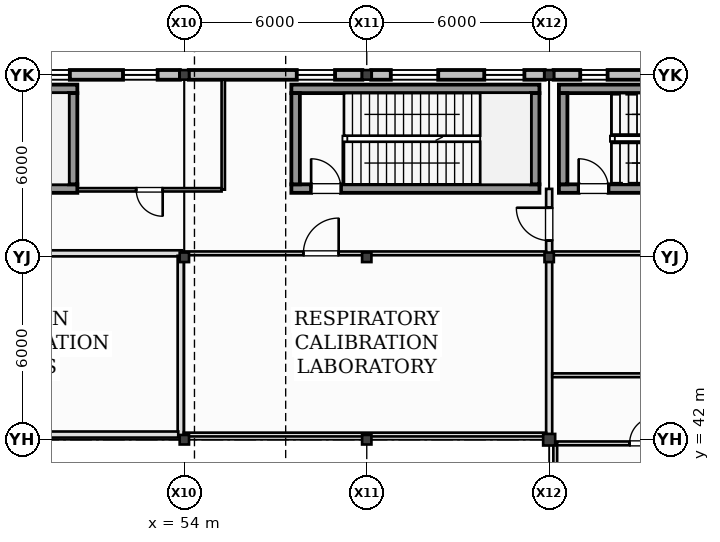
"""IFC4 building model, lengths in metres.
Left out: names, types, materials, properties, quantities, classifications, styles, units other than length and angle.
Written with IfcOpenShell. Run it as: python <this file> out.ifc"""

import sys

from ifc_helpers import new_model, si_unit, direction, frame, frame_2d, origin, origin_2d, place, context, subcontext, project, spatial, rectangle, i_section, extrude, element, fill, save


model = new_model("IFC4")
c1 = context("Model", 3, precision=1e-05, world=origin(), true_north=direction((0.0, 1.0)))
c2 = subcontext(c1, "Body", "Model", "MODEL_VIEW")
j1 = project(units=[si_unit("LENGTHUNIT", "METRE"), si_unit("PLANEANGLEUNIT", "RADIAN")], contexts=[c1])
p1 = place(None, origin())
s1 = spatial("IfcSite", under=j1, at=p1, CompositionType="ELEMENT")
p2 = place(p1, origin())
s2 = spatial("IfcBuilding", under=s1, at=p2, CompositionType="ELEMENT")
p3 = place(p2, frame((0.0, 0.0, 6.0)))
s3 = spatial("IfcBuildingStorey", under=s2, at=p3, CompositionType="ELEMENT", Elevation=6.0)
for number, where, z_axis, x_axis in (
    (1, (54.0, 42.0, 0.0), (0.0, 0.0, 1.0), (1.0, 0.0, 0.0)),
    (2, (54.0, 48.0, 0.0), (0.0, 0.0, 1.0), (1.0, 0.0, 0.0)),
    (3, (54.0, 54.0, 0.0), (0.0, 0.0, 1.0), (1.0, 0.0, 0.0)),
    (4, (60.0, 42.0, 0.0), (0.0, 0.0, 1.0), (1.0, 0.0, 0.0)),
    (5, (60.0, 48.0, 0.0), (0.0, 0.0, 1.0), (1.0, 0.0, 0.0)),
    (6, (60.0, 54.0, 0.0), (0.0, 0.0, 1.0), (1.0, 0.0, 0.0)),
):
    element("IfcColumn", number, at=place(p3, frame(where, z_axis=z_axis, x_axis=x_axis)), inside=s3, PredefinedType="COLUMN", context=c2, shape_type="SweptSolid", body=[
        extrude(i_section(OverallWidth=0.307, OverallDepth=0.314, WebThickness=0.011, FlangeThickness=0.019, at=origin_2d()), origin(), (0.0, 0.0, 1.0), 4.0),
    ])
p4 = place(p3, frame((66.0, 42.0, 0.0), z_axis=(0.0, 0.0, 1.0), x_axis=(1.0, 0.0, 0.0)))
e7 = element("IfcColumn", 7, at=p4, inside=s3, PredefinedType="COLUMN", context=c2, shape_type="SweptSolid", body=[
    extrude(i_section(OverallWidth=0.395, OverallDepth=0.38, WebThickness=0.019, FlangeThickness=0.03, at=origin_2d()), origin(), (0.0, 0.0, 1.0), 4.0),
])
for number, where, z_axis, x_axis in (
    (8, (66.0, 48.0, 0.0), (0.0, 0.0, 1.0), (1.0, 0.0, 0.0)),
    (9, (66.0, 54.0, 0.0), (0.0, 0.0, 1.0), (1.0, 0.0, 0.0)),
):
    element("IfcColumn", number, at=place(p3, frame(where, z_axis=z_axis, x_axis=x_axis)), inside=s3, PredefinedType="COLUMN", context=c2, shape_type="SweptSolid", body=[
        extrude(i_section(OverallWidth=0.307, OverallDepth=0.314, WebThickness=0.011, FlangeThickness=0.019, at=origin_2d()), origin(), (0.0, 0.0, 1.0), 4.0),
    ])
p5 = place(p3, frame((53.855, 54.0, 0.0), z_axis=(0.0, 0.0, 1.0), x_axis=(-1.0, 0.0, 0.0)))
e10 = element("IfcWall", 10, at=p5, inside=s3, PredefinedType="STANDARD", context=c2, shape_type="SweptSolid", body=[
    extrude(rectangle(XDim=5.71, YDim=0.32, at=frame_2d((2.855, 0.0))), origin(), (0.0, 0.0, 1.0), 4.0),
])
p6 = place(p5, frame((0.733, 0.0, 1.28)))
e11 = element("IfcOpeningElement", 11, at=p6, cuts=e10, PredefinedType="OPENING", context=c2, shape_type="SweptSolid", body=[
    extrude(rectangle(XDim=1.14, YDim=1.14, at=frame_2d((0.57, 0.57))), frame((0.0, 0.17, 0.0), z_axis=(0.0, -1.0, 0.0), x_axis=(1.0, 0.0, 0.0)), (0.0, 0.0, 1.0), 0.34),
])
p7 = place(p5, frame((3.621, 0.0, 1.18)))
e12 = element("IfcOpeningElement", 12, at=p7, cuts=e10, PredefinedType="OPENING", context=c2, shape_type="SweptSolid", body=[
    extrude(rectangle(XDim=1.38, YDim=1.38, at=frame_2d((0.69, 0.69))), frame((0.0, 0.17, 0.0), z_axis=(0.0, -1.0, 0.0), x_axis=(1.0, 0.0, 0.0)), (0.0, 0.0, 1.0), 0.34),
])
p8 = place(p3, frame((59.855, 54.0, 0.0), z_axis=(0.0, 0.0, 1.0), x_axis=(-1.0, 0.0, 0.0)))
e13 = element("IfcWall", 13, at=p8, inside=s3, PredefinedType="STANDARD", context=c2, shape_type="SweptSolid", body=[
    extrude(rectangle(XDim=5.71, YDim=0.32, at=frame_2d((2.855, 0.0))), origin(), (0.0, 0.0, 1.0), 4.0),
])
p9 = place(p8, frame((0.897, 0.0, 0.86)))
e14 = element("IfcOpeningElement", 14, at=p9, cuts=e13, PredefinedType="OPENING", context=c2, shape_type="SweptSolid", body=[
    extrude(rectangle(XDim=1.26, YDim=1.26, at=frame_2d((0.63, 0.63))), frame((0.0, 0.17, 0.0), z_axis=(0.0, -1.0, 0.0), x_axis=(1.0, 0.0, 0.0)), (0.0, 0.0, 1.0), 0.34),
])
p10 = place(p3, frame((65.855, 54.0, 0.0), z_axis=(0.0, 0.0, 1.0), x_axis=(-1.0, 0.0, 0.0)))
e15 = element("IfcWall", 15, at=p10, inside=s3, PredefinedType="STANDARD", context=c2, shape_type="SweptSolid", body=[
    extrude(rectangle(XDim=5.71, YDim=0.32, at=frame_2d((2.855, 0.0))), origin(), (0.0, 0.0, 1.0), 4.0),
])
p11 = place(p10, frame((0.67, 0.0, 1.18)))
e16 = element("IfcOpeningElement", 16, at=p11, cuts=e15, PredefinedType="OPENING", context=c2, shape_type="SweptSolid", body=[
    extrude(rectangle(XDim=1.32, YDim=1.32, at=frame_2d((0.66, 0.66))), frame((0.0, 0.17, 0.0), z_axis=(0.0, -1.0, 0.0), x_axis=(1.0, 0.0, 0.0)), (0.0, 0.0, 1.0), 0.34),
])
p12 = place(p10, frame((3.504, 0.0, 0.96)))
e17 = element("IfcOpeningElement", 17, at=p12, cuts=e15, PredefinedType="OPENING", context=c2, shape_type="SweptSolid", body=[
    extrude(rectangle(XDim=1.56, YDim=1.56, at=frame_2d((0.78, 0.78))), frame((0.0, 0.17, 0.0), z_axis=(0.0, -1.0, 0.0), x_axis=(1.0, 0.0, 0.0)), (0.0, 0.0, 1.0), 0.34),
])
p13 = place(p3, frame((71.855, 54.0, 0.0), z_axis=(0.0, 0.0, 1.0), x_axis=(-1.0, 0.0, 0.0)))
e18 = element("IfcWall", 18, at=p13, inside=s3, PredefinedType="STANDARD", context=c2, shape_type="SweptSolid", body=[
    extrude(rectangle(XDim=5.71, YDim=0.32, at=frame_2d((2.855, 0.0))), origin(), (0.0, 0.0, 1.0), 3.153),
])
p14 = place(p13, frame((0.649, 0.0, 0.96)))
e19 = element("IfcOpeningElement", 19, at=p14, cuts=e18, PredefinedType="OPENING", context=c2, shape_type="SweptSolid", body=[
    extrude(rectangle(XDim=1.38, YDim=1.38, at=frame_2d((0.69, 0.69))), frame((0.0, 0.17, 0.0), z_axis=(0.0, -1.0, 0.0), x_axis=(1.0, 0.0, 0.0)), (0.0, 0.0, 1.0), 0.34),
])
p15 = place(p13, frame((3.933, 0.0, 0.86)))
e20 = element("IfcOpeningElement", 20, at=p15, cuts=e18, PredefinedType="OPENING", context=c2, shape_type="SweptSolid", body=[
    extrude(rectangle(XDim=0.9, YDim=0.9, at=frame_2d((0.45, 0.45))), frame((0.0, 0.17, 0.0), z_axis=(0.0, -1.0, 0.0), x_axis=(1.0, 0.0, 0.0)), (0.0, 0.0, 1.0), 0.34),
])
p16 = place(p3, frame((42.32, 50.26, 0.0), z_axis=(0.0, 0.0, 1.0), x_axis=(1.0, 0.0, 0.0)))
e21 = element("IfcWall", 21, at=p16, inside=s3, PredefinedType="SHEAR", context=c2, shape_type="SweptSolid", body=[
    extrude(rectangle(XDim=8.16, YDim=0.28, at=frame_2d((4.08, 0.0))), origin(), (0.0, 0.0, 1.0), 3.75),
])
p17 = place(p16, frame((0.65, 0.0, 0.0)))
e22 = element("IfcOpeningElement", 22, at=p17, cuts=e21, PredefinedType="OPENING", context=c2, shape_type="SweptSolid", body=[
    extrude(rectangle(XDim=0.98, YDim=2.15, at=frame_2d((0.49, 1.075))), frame((0.0, 0.15, 0.0), z_axis=(0.0, -1.0, 0.0), x_axis=(1.0, 0.0, 0.0)), (0.0, 0.0, 1.0), 0.3),
])
p18 = place(p3, frame((50.48, 53.54, 0.0), z_axis=(0.0, 0.0, 1.0), x_axis=(-1.0, 0.0, 0.0)))
e23 = element("IfcWall", 23, at=p18, inside=s3, PredefinedType="SHEAR", context=c2, shape_type="SweptSolid", body=[
    extrude(rectangle(XDim=8.16, YDim=0.28, at=frame_2d((4.08, 0.0))), origin(), (0.0, 0.0, 1.0), 3.75),
])
p19 = place(p3, frame((50.34, 50.4, 0.0), z_axis=(0.0, 0.0, 1.0), x_axis=(0.0, 1.0, 0.0)))
e24 = element("IfcWall", 24, at=p19, inside=s3, PredefinedType="SHEAR", context=c2, shape_type="SweptSolid", body=[
    extrude(rectangle(XDim=3.0, YDim=0.28, at=frame_2d((1.5, 0.0))), origin(), (0.0, 0.0, 1.0), 3.75),
])
p20 = place(p3, frame((57.52, 50.26, 0.0), z_axis=(0.0, 0.0, 1.0), x_axis=(1.0, 0.0, 0.0)))
e25 = element("IfcWall", 25, at=p20, inside=s3, PredefinedType="SHEAR", context=c2, shape_type="SweptSolid", body=[
    extrude(rectangle(XDim=8.16, YDim=0.28, at=frame_2d((4.08, 0.0))), origin(), (0.0, 0.0, 1.0), 3.75),
])
p21 = place(p20, frame((0.65, 0.0, 0.0)))
e26 = element("IfcOpeningElement", 26, at=p21, cuts=e25, PredefinedType="OPENING", context=c2, shape_type="SweptSolid", body=[
    extrude(rectangle(XDim=0.98, YDim=2.15, at=frame_2d((0.49, 1.075))), frame((0.0, 0.15, 0.0), z_axis=(0.0, -1.0, 0.0), x_axis=(1.0, 0.0, 0.0)), (0.0, 0.0, 1.0), 0.3),
])
p22 = place(p3, frame((65.68, 53.54, 0.0), z_axis=(0.0, 0.0, 1.0), x_axis=(-1.0, 0.0, 0.0)))
e27 = element("IfcWall", 27, at=p22, inside=s3, PredefinedType="SHEAR", context=c2, shape_type="SweptSolid", body=[
    extrude(rectangle(XDim=8.16, YDim=0.28, at=frame_2d((4.08, 0.0))), origin(), (0.0, 0.0, 1.0), 3.75),
])
for number, where, z_axis, x_axis in (
    (28, (57.66, 53.4, 0.0), (0.0, 0.0, 1.0), (0.0, -1.0, 0.0)),
    (29, (65.54, 50.4, 0.0), (0.0, 0.0, 1.0), (0.0, 1.0, 0.0)),
):
    element("IfcWall", number, at=place(p3, frame(where, z_axis=z_axis, x_axis=x_axis)), inside=s3, PredefinedType="SHEAR", context=c2, shape_type="SweptSolid", body=[
        extrude(rectangle(XDim=3.0, YDim=0.28, at=frame_2d((1.5, 0.0))), origin(), (0.0, 0.0, 1.0), 3.75),
    ])
p23 = place(p3, frame((66.32, 50.26, 0.0), z_axis=(0.0, 0.0, 1.0), x_axis=(1.0, 0.0, 0.0)))
e30 = element("IfcWall", 30, at=p23, inside=s3, PredefinedType="SHEAR", context=c2, shape_type="SweptSolid", body=[
    extrude(rectangle(XDim=8.16, YDim=0.28, at=frame_2d((4.08, 0.0))), origin(), (0.0, 0.0, 1.0), 4.0),
])
p24 = place(p23, frame((0.65, 0.0, 0.0)))
e31 = element("IfcOpeningElement", 31, at=p24, cuts=e30, PredefinedType="OPENING", context=c2, shape_type="SweptSolid", body=[
    extrude(rectangle(XDim=0.98, YDim=2.15, at=frame_2d((0.49, 1.075))), frame((0.0, 0.15, 0.0), z_axis=(0.0, -1.0, 0.0), x_axis=(1.0, 0.0, 0.0)), (0.0, 0.0, 1.0), 0.3),
])
p25 = place(p3, frame((74.48, 53.54, 0.0), z_axis=(0.0, 0.0, 1.0), x_axis=(-1.0, 0.0, 0.0)))
e32 = element("IfcWall", 32, at=p25, inside=s3, PredefinedType="SHEAR", context=c2, shape_type="SweptSolid", body=[
    extrude(rectangle(XDim=8.16, YDim=0.28, at=frame_2d((4.08, 0.0))), origin(), (0.0, 0.0, 1.0), 4.0),
])
p26 = place(p3, frame((66.46, 53.4, 0.0), z_axis=(0.0, 0.0, 1.0), x_axis=(0.0, -1.0, 0.0)))
e33 = element("IfcWall", 33, at=p26, inside=s3, PredefinedType="SHEAR", context=c2, shape_type="SweptSolid", body=[
    extrude(rectangle(XDim=3.0, YDim=0.28, at=frame_2d((1.5, 0.0))), origin(), (0.0, 0.0, 1.0), 4.0),
])
p27 = place(p3, frame((66.0, 42.18, 0.0), z_axis=(0.0, 0.0, 1.0), x_axis=(0.0, 1.0, 0.0)))
e34 = element("IfcWall", 34, at=p27, inside=s3, PredefinedType="PARTITIONING", context=c2, shape_type="SweptSolid", body=[
    extrude(rectangle(XDim=5.72, YDim=0.2, at=frame_2d((2.86, 0.0))), origin(), (0.0, 0.0, 1.0), 3.65),
])
p28 = place(p3, frame((66.0, 48.05, 0.0), z_axis=(0.0, 0.0, 1.0), x_axis=(0.0, 1.0, 0.0)))
e35 = element("IfcWall", 35, at=p28, inside=s3, PredefinedType="PARTITIONING", context=c2, shape_type="SweptSolid", body=[
    extrude(rectangle(XDim=2.2, YDim=0.2, at=frame_2d((1.1, 0.0))), origin(), (0.0, 0.0, 1.0), 3.65),
])
p29 = place(p28, frame((0.5, 0.0, 0.0)))
e36 = element("IfcOpeningElement", 36, at=p29, cuts=e35, PredefinedType="OPENING", context=c2, shape_type="SweptSolid", body=[
    extrude(rectangle(XDim=1.08, YDim=2.14, at=frame_2d((0.54, 1.07))), frame((0.0, 0.11, 0.0), z_axis=(0.0, -1.0, 0.0), x_axis=(1.0, 0.0, 0.0)), (0.0, 0.0, 1.0), 0.22),
])
p30 = place(p3, frame((42.16, 48.13, 0.0), z_axis=(0.0, 0.0, 1.0), x_axis=(1.0, 0.0, 0.0)))
e37 = element("IfcWall", 37, at=p30, inside=s3, PredefinedType="PARTITIONING", context=c2, shape_type="SweptSolid", body=[
    extrude(rectangle(XDim=11.76, YDim=0.2, at=frame_2d((5.88, 0.0))), origin(), (0.0, 0.0, 1.0), 3.72),
])
p31 = place(p30, frame((3.969, 0.0, 0.0)))
e38 = element("IfcOpeningElement", 38, at=p31, cuts=e37, PredefinedType="OPENING", context=c2, shape_type="SweptSolid", body=[
    extrude(rectangle(XDim=0.91, YDim=2.1, at=frame_2d((0.455, 1.05))), frame((0.0, 0.11, 0.0), z_axis=(0.0, -1.0, 0.0), x_axis=(1.0, 0.0, 0.0)), (0.0, 0.0, 1.0), 0.22),
])
p32 = place(p3, frame((53.88, 48.05, 0.0), z_axis=(0.0, 0.0, 1.0), x_axis=(0.0, -1.0, 0.0)))
e39 = element("IfcWall", 39, at=p32, inside=s3, PredefinedType="PARTITIONING", context=c2, shape_type="SweptSolid", body=[
    extrude(rectangle(XDim=5.92, YDim=0.2, at=frame_2d((2.96, 0.0))), origin(), (0.0, 0.0, 1.0), 3.72),
])
p33 = place(p3, frame((53.8, 42.17, 0.0), z_axis=(0.0, 0.0, 1.0), x_axis=(-1.0, 0.0, 0.0)))
e40 = element("IfcWall", 40, at=p33, inside=s3, PredefinedType="PARTITIONING", context=c2, shape_type="SweptSolid", body=[
    extrude(rectangle(XDim=11.64, YDim=0.2, at=frame_2d((5.82, 0.0))), origin(), (0.0, 0.0, 1.0), 3.72),
])
p34 = place(p3, frame((53.98, 48.13, 0.0), z_axis=(0.0, 0.0, 1.0), x_axis=(1.0, 0.0, 0.0)))
e41 = element("IfcWall", 41, at=p34, inside=s3, PredefinedType="PARTITIONING", context=c2, shape_type="SweptSolid", body=[
    extrude(rectangle(XDim=11.92, YDim=0.125, at=frame_2d((5.96, 0.0))), origin(), (0.0, 0.0, 1.0), 3.72),
])
p35 = place(p34, frame((3.936, 0.0, 0.0)))
e42 = element("IfcOpeningElement", 42, at=p35, cuts=e41, PredefinedType="OPENING", context=c2, shape_type="SweptSolid", body=[
    extrude(rectangle(XDim=1.16, YDim=2.2, at=frame_2d((0.58, 1.1))), frame((0.0, 0.073, 0.0), z_axis=(0.0, -1.0, 0.0), x_axis=(1.0, 0.0, 0.0)), (0.0, 0.0, 1.0), 0.145),
])
p36 = place(p3, frame((65.9, 42.17, 0.0), z_axis=(0.0, 0.0, 1.0), x_axis=(-1.0, 0.0, 0.0)))
e43 = element("IfcWall", 43, at=p36, inside=s3, PredefinedType="PARTITIONING", context=c2, shape_type="SweptSolid", body=[
    extrude(rectangle(XDim=11.92, YDim=0.125, at=frame_2d((5.96, 0.0))), origin(), (0.0, 0.0, 1.0), 3.72),
])
p37 = place(p3, frame((55.28, 53.84, 0.0), z_axis=(0.0, 0.0, 1.0), x_axis=(0.0, -1.0, 0.0)))
e44 = element("IfcWall", 44, at=p37, inside=s3, PredefinedType="PARTITIONING", context=c2, shape_type="SweptSolid", body=[
    extrude(rectangle(XDim=3.615, YDim=0.11, at=frame_2d((1.808, 0.0))), origin(), (0.0, 0.0, 1.0), 3.72),
])
p38 = place(p3, frame((55.225, 50.22, 0.0), z_axis=(0.0, 0.0, 1.0), x_axis=(-1.0, 0.0, 0.0)))
e45 = element("IfcWall", 45, at=p38, inside=s3, PredefinedType="PARTITIONING", context=c2, shape_type="SweptSolid", body=[
    extrude(rectangle(XDim=4.745, YDim=0.11, at=frame_2d((2.373, 0.0))), origin(), (0.0, 0.0, 1.0), 3.72),
])
p39 = place(p38, frame((1.938, 0.0, 0.0)))
e46 = element("IfcOpeningElement", 46, at=p39, cuts=e45, PredefinedType="OPENING", context=c2, shape_type="SweptSolid", body=[
    extrude(rectangle(XDim=0.87, YDim=2.06, at=frame_2d((0.435, 1.03))), frame((0.0, 0.065, 0.0), z_axis=(0.0, -1.0, 0.0), x_axis=(1.0, 0.0, 0.0)), (0.0, 0.0, 1.0), 0.13),
])
p40 = place(p3, frame((66.2, 18.16, 0.0), z_axis=(0.0, 0.0, 1.0), x_axis=(0.0, 1.0, 0.0)))
e47 = element("IfcWall", 47, at=p40, inside=s3, PredefinedType="PARTITIONING", context=c2, shape_type="SweptSolid", body=[
    extrude(rectangle(XDim=23.723, YDim=0.125, at=frame_2d((11.861, 0.0))), origin(), (0.0, 0.0, 1.0), 2.999),
])
p41 = place(p3, frame((66.262, 41.88, 0.0), z_axis=(0.0, 0.0, 1.0), x_axis=(1.0, 0.0, 0.0)))
e48 = element("IfcWall", 48, at=p41, inside=s3, PredefinedType="PARTITIONING", context=c2, shape_type="SweptSolid", body=[
    extrude(rectangle(XDim=5.637, YDim=0.125, at=frame_2d((2.819, 0.0))), origin(), (0.0, 0.0, 1.0), 3.153),
])
p42 = place(p41, frame((2.384, 0.0, 0.0)))
e49 = element("IfcOpeningElement", 49, at=p42, cuts=e48, PredefinedType="OPENING", context=c2, shape_type="SweptSolid", body=[
    extrude(rectangle(XDim=0.87, YDim=2.06, at=frame_2d((0.435, 1.03))), frame((0.0, 0.073, 0.0), z_axis=(0.0, -1.0, 0.0), x_axis=(1.0, 0.0, 0.0)), (0.0, 0.0, 1.0), 0.145),
])
p43 = place(p3, frame((66.1, 48.13, 0.0), z_axis=(0.0, 0.0, 1.0), x_axis=(1.0, 0.0, 0.0)))
e50 = element("IfcWall", 50, at=p43, inside=s3, PredefinedType="PARTITIONING", context=c2, shape_type="SweptSolid", body=[
    extrude(rectangle(XDim=15.782, YDim=0.125, at=frame_2d((7.891, 0.0))), origin(), (0.0, 0.0, 1.0), 3.153),
])
p44 = place(p43, frame((7.3, 0.0, 0.0)))
e51 = element("IfcOpeningElement", 51, at=p44, cuts=e50, PredefinedType="OPENING", context=c2, shape_type="SweptSolid", body=[
    extrude(rectangle(XDim=0.96, YDim=2.15, at=frame_2d((0.48, 1.075))), frame((0.0, 0.073, 0.0), z_axis=(0.0, -1.0, 0.0), x_axis=(1.0, 0.0, 0.0)), (0.0, 0.0, 1.0), 0.145),
])
p45 = place(p3, frame((81.817, 44.12, 0.0), z_axis=(0.0, 0.0, 1.0), x_axis=(-1.0, 0.0, 0.0)))
e52 = element("IfcWall", 52, at=p45, inside=s3, PredefinedType="PARTITIONING", context=c2, shape_type="SweptSolid", body=[
    extrude(rectangle(XDim=15.717, YDim=0.125, at=frame_2d((7.859, 0.0))), origin(), (0.0, 0.0, 1.0), 3.72),
])
p46 = place(p6, origin())
e53 = element("IfcWindow", 53, at=p46, inside=s3, PartitioningType="SINGLE_PANEL", PredefinedType="WINDOW", context=c2, shape_type="SweptSolid", body=[
    extrude(rectangle(XDim=1.14, YDim=1.14, at=frame_2d((0.57, 0.57))), frame((0.0, 0.03, 0.0), z_axis=(0.0, -1.0, 0.0), x_axis=(1.0, 0.0, 0.0)), (0.0, 0.0, 1.0), 0.06),
])
fill(e11, e53)
p47 = place(p7, origin())
e54 = element("IfcWindow", 54, at=p47, inside=s3, PartitioningType="SINGLE_PANEL", PredefinedType="WINDOW", context=c2, shape_type="SweptSolid", body=[
    extrude(rectangle(XDim=1.38, YDim=1.38, at=frame_2d((0.69, 0.69))), frame((0.0, 0.03, 0.0), z_axis=(0.0, -1.0, 0.0), x_axis=(1.0, 0.0, 0.0)), (0.0, 0.0, 1.0), 0.06),
])
fill(e12, e54)
p48 = place(p9, origin())
e55 = element("IfcWindow", 55, at=p48, inside=s3, PartitioningType="SINGLE_PANEL", PredefinedType="WINDOW", context=c2, shape_type="SweptSolid", body=[
    extrude(rectangle(XDim=1.26, YDim=1.26, at=frame_2d((0.63, 0.63))), frame((0.0, 0.03, 0.0), z_axis=(0.0, -1.0, 0.0), x_axis=(1.0, 0.0, 0.0)), (0.0, 0.0, 1.0), 0.06),
])
fill(e14, e55)
p49 = place(p11, origin())
e56 = element("IfcWindow", 56, at=p49, inside=s3, PartitioningType="SINGLE_PANEL", PredefinedType="WINDOW", context=c2, shape_type="SweptSolid", body=[
    extrude(rectangle(XDim=1.32, YDim=1.32, at=frame_2d((0.66, 0.66))), frame((0.0, 0.03, 0.0), z_axis=(0.0, -1.0, 0.0), x_axis=(1.0, 0.0, 0.0)), (0.0, 0.0, 1.0), 0.06),
])
fill(e16, e56)
p50 = place(p12, origin())
e57 = element("IfcWindow", 57, at=p50, inside=s3, PartitioningType="SINGLE_PANEL", PredefinedType="WINDOW", context=c2, shape_type="SweptSolid", body=[
    extrude(rectangle(XDim=1.56, YDim=1.56, at=frame_2d((0.78, 0.78))), frame((0.0, 0.03, 0.0), z_axis=(0.0, -1.0, 0.0), x_axis=(1.0, 0.0, 0.0)), (0.0, 0.0, 1.0), 0.06),
])
fill(e17, e57)
p51 = place(p15, origin())
e58 = element("IfcWindow", 58, at=p51, inside=s3, PartitioningType="SINGLE_PANEL", PredefinedType="WINDOW", context=c2, shape_type="SweptSolid", body=[
    extrude(rectangle(XDim=0.9, YDim=0.9, at=frame_2d((0.45, 0.45))), frame((0.0, 0.03, 0.0), z_axis=(0.0, -1.0, 0.0), x_axis=(1.0, 0.0, 0.0)), (0.0, 0.0, 1.0), 0.06),
])
fill(e20, e58)
p52 = place(p21, origin())
e59 = element("IfcDoor", 59, at=p52, inside=s3, OperationType="SINGLE_SWING_LEFT", PredefinedType="DOOR", context=c2, shape_type="SweptSolid", body=[
    extrude(rectangle(XDim=0.98, YDim=2.15, at=frame_2d((0.49, 1.075))), frame((0.0, 0.025, 0.0), z_axis=(0.0, -1.0, 0.0), x_axis=(1.0, 0.0, 0.0)), (0.0, 0.0, 1.0), 0.05),
])
fill(e26, e59)
p53 = place(p24, origin())
e60 = element("IfcDoor", 60, at=p53, inside=s3, OperationType="SINGLE_SWING_LEFT", PredefinedType="DOOR", context=c2, shape_type="SweptSolid", body=[
    extrude(rectangle(XDim=0.98, YDim=2.15, at=frame_2d((0.49, 1.075))), frame((0.0, 0.025, 0.0), z_axis=(0.0, -1.0, 0.0), x_axis=(1.0, 0.0, 0.0)), (0.0, 0.0, 1.0), 0.05),
])
fill(e31, e60)
p54 = place(p29, frame((1.08, 0.0, 0.0), z_axis=(0.0, 0.0, 1.0), x_axis=(-1.0, 0.0, 0.0)))
e61 = element("IfcDoor", 61, at=p54, inside=s3, OperationType="SINGLE_SWING_RIGHT", PredefinedType="DOOR", context=c2, shape_type="SweptSolid", body=[
    extrude(rectangle(XDim=1.08, YDim=2.14, at=frame_2d((0.54, 1.07))), frame((0.0, 0.025, 0.0), z_axis=(0.0, -1.0, 0.0), x_axis=(1.0, 0.0, 0.0)), (0.0, 0.0, 1.0), 0.05),
])
fill(e36, e61)
p55 = place(p35, frame((1.16, 0.0, 0.0), z_axis=(0.0, 0.0, 1.0), x_axis=(-1.0, 0.0, 0.0)))
e62 = element("IfcDoor", 62, at=p55, inside=s3, OperationType="SINGLE_SWING_RIGHT", PredefinedType="DOOR", context=c2, shape_type="SweptSolid", body=[
    extrude(rectangle(XDim=1.16, YDim=2.2, at=frame_2d((0.58, 1.1))), frame((0.0, 0.025, 0.0), z_axis=(0.0, -1.0, 0.0), x_axis=(1.0, 0.0, 0.0)), (0.0, 0.0, 1.0), 0.05),
])
fill(e42, e62)
p56 = place(p39, frame((0.87, 0.0, 0.0), z_axis=(0.0, 0.0, 1.0), x_axis=(-1.0, 0.0, 0.0)))
e63 = element("IfcDoor", 63, at=p56, inside=s3, OperationType="SINGLE_SWING_LEFT", PredefinedType="DOOR", context=c2, shape_type="SweptSolid", body=[
    extrude(rectangle(XDim=0.87, YDim=2.06, at=frame_2d((0.435, 1.03))), frame((0.0, 0.025, 0.0), z_axis=(0.0, -1.0, 0.0), x_axis=(1.0, 0.0, 0.0)), (0.0, 0.0, 1.0), 0.05),
])
fill(e46, e63)
p57 = place(p42, frame((0.87, 0.0, 0.0), z_axis=(0.0, 0.0, 1.0), x_axis=(-1.0, 0.0, 0.0)))
e64 = element("IfcDoor", 64, at=p57, inside=s3, OperationType="SINGLE_SWING_RIGHT", PredefinedType="DOOR", context=c2, shape_type="SweptSolid", body=[
    extrude(rectangle(XDim=0.87, YDim=2.06, at=frame_2d((0.435, 1.03))), frame((0.0, 0.025, 0.0), z_axis=(0.0, -1.0, 0.0), x_axis=(1.0, 0.0, 0.0)), (0.0, 0.0, 1.0), 0.05),
])
fill(e49, e64)
save(model, sys.argv[1])
